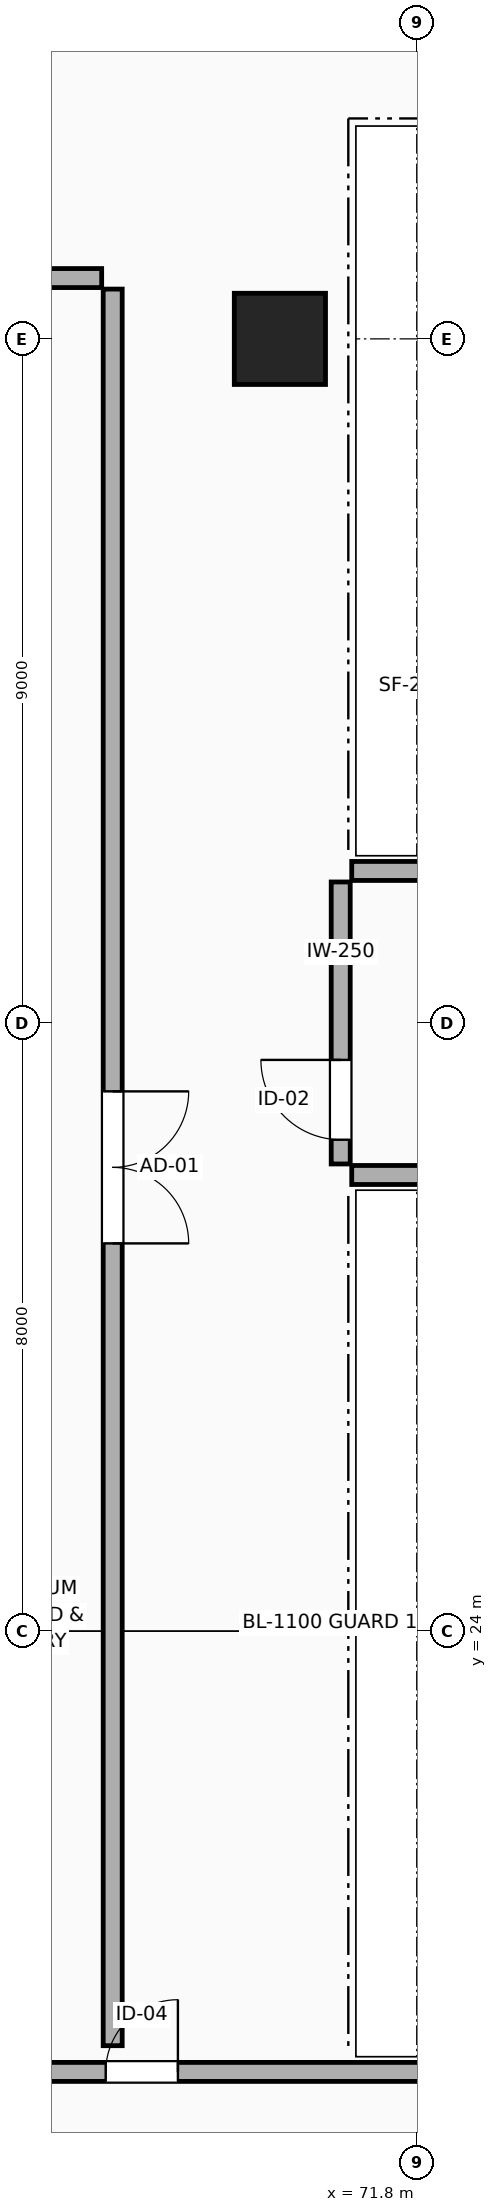
"""IFC4 building model, lengths in metres.
Left out: names, types, materials, properties, quantities, classifications, styles, units other than length and angle.
Written with IfcOpenShell. Run it as: python <this file> out.ifc"""

import sys

from ifc_helpers import new_model, si_unit, direction, frame, frame_2d, origin, origin_2d, place, context, subcontext, project, spatial, rectangle, extrude, element, fill, save


model = new_model("IFC4")
c1 = context("Model", 3, precision=1e-05, world=origin(), true_north=direction((0.0, 1.0)))
c2 = subcontext(c1, "Body", "Model", "MODEL_VIEW")
j1 = project(units=[si_unit("LENGTHUNIT", "METRE"), si_unit("PLANEANGLEUNIT", "RADIAN")], contexts=[c1])
p1 = place(None, origin())
s1 = spatial("IfcSite", under=j1, at=p1, CompositionType="ELEMENT")
p2 = place(p1, origin())
s2 = spatial("IfcBuilding", under=s1, at=p2, CompositionType="ELEMENT")
p3 = place(p2, frame((0.0, 0.0, 19.8)))
s3 = spatial("IfcBuildingStorey", under=s2, at=p3, CompositionType="ELEMENT", Elevation=19.8)
p4 = place(p3, frame((70.0, 41.0, 0.0), z_axis=(0.0, 0.0, 1.0), x_axis=(1.0, 0.0, 0.0)))
e1 = element("IfcColumn", 1, at=p4, inside=s3, PredefinedType="COLUMN", context=c2, shape_type="SweptSolid", body=[
    extrude(rectangle(XDim=1.2, YDim=1.2, at=origin_2d()), origin(), (0.0, 0.0, 1.0), 4.5),
])
for number, where, z_axis, x_axis in (
    (2, (70.945, 34.0, 0.0), (0.0, 0.0, 1.0), (1.0, 0.0, 0.0)),
    (3, (118.226, 30.0, 0.0), (0.0, 0.0, 1.0), (-1.0, 0.0, 0.0)),
):
    element("IfcWall", number, at=place(p3, frame(where, z_axis=z_axis, x_axis=x_axis)), inside=s3, PredefinedType="PARTITIONING", context=c2, shape_type="SweptSolid", body=[
        extrude(rectangle(XDim=47.281, YDim=0.25, at=frame_2d((23.641, 0.0))), origin(), (0.0, 0.0, 1.0), 4.5),
    ])
p5 = place(p3, frame((70.8, 30.145, 0.0), z_axis=(0.0, 0.0, 1.0), x_axis=(0.0, 1.0, 0.0)))
e4 = element("IfcWall", 4, at=p5, inside=s3, PredefinedType="PARTITIONING", context=c2, shape_type="SweptSolid", body=[
    extrude(rectangle(XDim=3.71, YDim=0.25, at=frame_2d((1.855, 0.0))), origin(), (0.0, 0.0, 1.0), 4.5),
])
p6 = place(p5, frame((0.319, 0.0, 0.0)))
e5 = element("IfcOpeningElement", 5, at=p6, cuts=e4, PredefinedType="OPENING", context=c2, shape_type="SweptSolid", body=[
    extrude(rectangle(XDim=1.05, YDim=2.15, at=frame_2d((0.525, 1.075))), frame((0.0, 0.135, 0.0), z_axis=(0.0, -1.0, 0.0), x_axis=(1.0, 0.0, 0.0)), (0.0, 0.0, 1.0), 0.27),
])
p7 = place(p3, frame((64.374, 18.2, 0.0), z_axis=(0.0, 0.0, 1.0), x_axis=(1.0, 0.0, 0.0)))
e6 = element("IfcWall", 6, at=p7, inside=s3, PredefinedType="PARTITIONING", context=c2, shape_type="SweptSolid", body=[
    extrude(rectangle(XDim=27.481, YDim=0.25, at=frame_2d((13.74, 0.0))), origin(), (0.0, 0.0, 1.0), 4.5),
])
p8 = place(p7, frame((3.334, 0.0, 0.0)))
e7 = element("IfcOpeningElement", 7, at=p8, cuts=e6, PredefinedType="OPENING", context=c2, shape_type="SweptSolid", body=[
    extrude(rectangle(XDim=0.95, YDim=2.15, at=frame_2d((0.475, 1.075))), frame((0.0, 0.135, 0.0), z_axis=(0.0, -1.0, 0.0), x_axis=(1.0, 0.0, 0.0)), (0.0, 0.0, 1.0), 0.27),
])
p9 = place(p3, frame((64.374, 41.8, 0.0), z_axis=(0.0, 0.0, 1.0), x_axis=(1.0, 0.0, 0.0)))
e8 = element("IfcWall", 8, at=p9, inside=s3, PredefinedType="PARTITIONING", context=c2, shape_type="SweptSolid", body=[
    extrude(rectangle(XDim=3.281, YDim=0.25, at=frame_2d((1.641, 0.0))), origin(), (0.0, 0.0, 1.0), 4.5),
])
p10 = place(p3, frame((67.8, 41.655, 0.0), z_axis=(0.0, 0.0, 1.0), x_axis=(0.0, -1.0, 0.0)))
e9 = element("IfcWall", 9, at=p10, inside=s3, PredefinedType="PARTITIONING", context=c2, shape_type="SweptSolid", body=[
    extrude(rectangle(XDim=23.11, YDim=0.25, at=frame_2d((11.555, 0.0))), origin(), (0.0, 0.0, 1.0), 4.5),
])
p11 = place(p10, frame((10.555, 0.0, 0.0)))
e10 = element("IfcOpeningElement", 10, at=p11, cuts=e9, PredefinedType="OPENING", context=c2, shape_type="SweptSolid", body=[
    extrude(rectangle(XDim=2.0, YDim=2.35, at=frame_2d((1.0, 1.175))), frame((0.0, 0.135, 0.0), z_axis=(0.0, -1.0, 0.0), x_axis=(1.0, 0.0, 0.0)), (0.0, 0.0, 1.0), 0.27),
])
p12 = place(p6, origin())
e11 = element("IfcDoor", 11, at=p12, inside=s3, OperationType="SINGLE_SWING_RIGHT", PredefinedType="DOOR", context=c2, shape_type="SweptSolid", body=[
    extrude(rectangle(XDim=1.05, YDim=2.15, at=frame_2d((0.525, 1.075))), frame((0.0, 0.025, 0.0), z_axis=(0.0, -1.0, 0.0), x_axis=(1.0, 0.0, 0.0)), (0.0, 0.0, 1.0), 0.05),
])
fill(e5, e11)
p13 = place(p8, origin())
e12 = element("IfcDoor", 12, at=p13, inside=s3, OperationType="SINGLE_SWING_RIGHT", PredefinedType="DOOR", context=c2, shape_type="SweptSolid", body=[
    extrude(rectangle(XDim=0.95, YDim=2.15, at=frame_2d((0.475, 1.075))), frame((0.0, 0.025, 0.0), z_axis=(0.0, -1.0, 0.0), x_axis=(1.0, 0.0, 0.0)), (0.0, 0.0, 1.0), 0.05),
])
fill(e7, e12)
p14 = place(p11, origin())
e13 = element("IfcDoor", 13, at=p14, inside=s3, OperationType="DOUBLE_SWING_LEFT", PredefinedType="DOOR", context=c2, shape_type="SweptSolid", body=[
    extrude(rectangle(XDim=2.0, YDim=2.35, at=frame_2d((1.0, 1.175))), frame((0.0, 0.025, 0.0), z_axis=(0.0, -1.0, 0.0), x_axis=(1.0, 0.0, 0.0)), (0.0, 0.0, 1.0), 0.05),
])
fill(e10, e13)
save(model, sys.argv[1])
